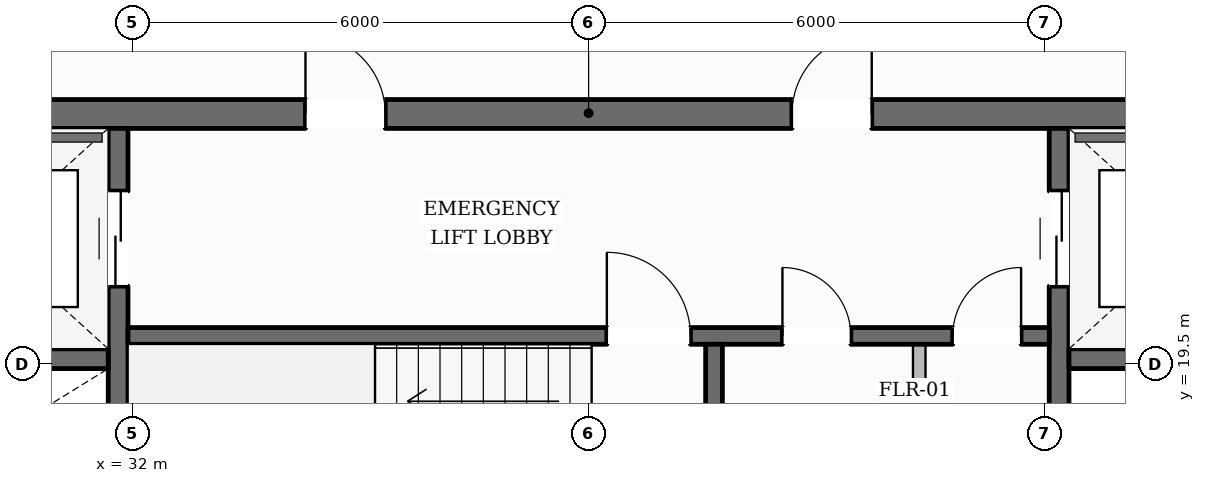
"""IFC4 building model, lengths in metres.
Left out: names, types, materials, properties, quantities, classifications, styles, units other than length and angle.
Written with IfcOpenShell. Run it as: python <this file> out.ifc"""

import sys

from ifc_helpers import new_model, si_unit, direction, frame, frame_2d, origin, place, context, subcontext, project, spatial, rectangle, extrude, element, fill, save


model = new_model("IFC4")
c1 = context("Model", 3, precision=1e-05, world=origin(), true_north=direction((0.0, 1.0)))
c2 = subcontext(c1, "Body", "Model", "MODEL_VIEW")
j1 = project(units=[si_unit("LENGTHUNIT", "METRE"), si_unit("PLANEANGLEUNIT", "RADIAN")], contexts=[c1])
p1 = place(None, origin())
s1 = spatial("IfcSite", under=j1, at=p1, CompositionType="ELEMENT")
p2 = place(p1, origin())
s2 = spatial("IfcBuilding", under=s1, at=p2, CompositionType="ELEMENT")
p3 = place(p2, frame((0.0, 0.0, 243.35)))
s3 = spatial("IfcBuildingStorey", under=s2, at=p3, CompositionType="ELEMENT", Elevation=243.35)
p4 = place(p3, frame((28.1, 22.79, 0.0), z_axis=(0.0, 0.0, 1.0), x_axis=(1.0, 0.0, 0.0)))
e1 = element("IfcWall", 1, at=p4, inside=s3, PredefinedType="SOLIDWALL", context=c2, shape_type="SweptSolid", body=[
    extrude(rectangle(XDim=19.8, YDim=0.38, at=frame_2d((9.9, 0.0))), origin(), (0.0, 0.0, 1.0), 3.61),
])
p5 = place(p4, frame((6.175, 0.0, 0.0)))
e2 = element("IfcOpeningElement", 2, at=p5, cuts=e1, PredefinedType="OPENING", context=c2, shape_type="SweptSolid", body=[
    extrude(rectangle(XDim=1.05, YDim=2.15, at=frame_2d((0.525, 1.075))), frame((0.0, 0.2, 0.0), z_axis=(0.0, -1.0, 0.0), x_axis=(1.0, 0.0, 0.0)), (0.0, 0.0, 1.0), 0.4),
])
p6 = place(p4, frame((12.575, 0.0, 0.0)))
e3 = element("IfcOpeningElement", 3, at=p6, cuts=e1, PredefinedType="OPENING", context=c2, shape_type="SweptSolid", body=[
    extrude(rectangle(XDim=1.05, YDim=2.15, at=frame_2d((0.525, 1.075))), frame((0.0, 0.2, 0.0), z_axis=(0.0, -1.0, 0.0), x_axis=(1.0, 0.0, 0.0)), (0.0, 0.0, 1.0), 0.4),
])
p7 = place(p3, frame((31.81, 9.6, 0.0), z_axis=(0.0, 0.0, 1.0), x_axis=(0.0, 1.0, 0.0)))
e4 = element("IfcWall", 4, at=p7, inside=s3, PredefinedType="SHEAR", context=c2, shape_type="SweptSolid", body=[
    extrude(rectangle(XDim=13.0, YDim=0.26, at=frame_2d((6.5, 0.0))), origin(), (0.0, 0.0, 1.0), 3.61),
])
p8 = place(p7, frame((10.925, 0.0, 0.0)))
e5 = element("IfcOpeningElement", 5, at=p8, cuts=e4, PredefinedType="OPENING", context=c2, shape_type="SweptSolid", body=[
    extrude(rectangle(XDim=1.25, YDim=2.25, at=frame_2d((0.625, 1.125))), frame((0.0, 0.14, 0.0), z_axis=(0.0, -1.0, 0.0), x_axis=(1.0, 0.0, 0.0)), (0.0, 0.0, 1.0), 0.28),
])
p9 = place(p3, frame((44.19, 9.6, 0.0), z_axis=(0.0, 0.0, 1.0), x_axis=(0.0, 1.0, 0.0)))
e6 = element("IfcWall", 6, at=p9, inside=s3, PredefinedType="SHEAR", context=c2, shape_type="SweptSolid", body=[
    extrude(rectangle(XDim=13.0, YDim=0.26, at=frame_2d((6.5, 0.0))), origin(), (0.0, 0.0, 1.0), 3.61),
])
p10 = place(p9, frame((10.925, 0.0, 0.0)))
e7 = element("IfcOpeningElement", 7, at=p10, cuts=e6, PredefinedType="OPENING", context=c2, shape_type="SweptSolid", body=[
    extrude(rectangle(XDim=1.25, YDim=2.25, at=frame_2d((0.625, 1.125))), frame((0.0, 0.14, 0.0), z_axis=(0.0, -1.0, 0.0), x_axis=(1.0, 0.0, 0.0)), (0.0, 0.0, 1.0), 0.28),
])
for number, where, z_axis, x_axis in (
    (8, (28.48, 19.57, 0.0), (0.0, 0.0, 1.0), (1.0, 0.0, 0.0)),
    (9, (44.32, 19.57, 0.0), (0.0, 0.0, 1.0), (1.0, 0.0, 0.0)),
):
    element("IfcWall", number, at=place(p3, frame(where, z_axis=z_axis, x_axis=x_axis)), inside=s3, PredefinedType="SHEAR", context=c2, shape_type="SweptSolid", body=[
        extrude(rectangle(XDim=3.2, YDim=0.26, at=frame_2d((1.6, 0.0))), origin(), (0.0, 0.0, 1.0), 3.61),
    ])
p11 = place(p3, frame((31.94, 19.87, 0.0), z_axis=(0.0, 0.0, 1.0), x_axis=(1.0, 0.0, 0.0)))
e10 = element("IfcWall", 10, at=p11, inside=s3, PredefinedType="SOLIDWALL", context=c2, shape_type="SweptSolid", body=[
    extrude(rectangle(XDim=12.12, YDim=0.22, at=frame_2d((6.06, 0.0))), origin(), (0.0, 0.0, 1.0), 3.61),
])
p12 = place(p11, frame((6.3, 0.0, 0.0)))
e11 = element("IfcOpeningElement", 11, at=p12, cuts=e10, PredefinedType="OPENING", context=c2, shape_type="SweptSolid", body=[
    extrude(rectangle(XDim=1.1, YDim=2.15, at=frame_2d((0.55, 1.075))), frame((0.0, 0.12, 0.0), z_axis=(0.0, -1.0, 0.0), x_axis=(1.0, 0.0, 0.0)), (0.0, 0.0, 1.0), 0.24),
])
p13 = place(p11, frame((8.61, 0.0, 0.0)))
e12 = element("IfcOpeningElement", 12, at=p13, cuts=e10, PredefinedType="OPENING", context=c2, shape_type="SweptSolid", body=[
    extrude(rectangle(XDim=0.9, YDim=2.1, at=frame_2d((0.45, 1.05))), frame((0.0, 0.12, 0.0), z_axis=(0.0, -1.0, 0.0), x_axis=(1.0, 0.0, 0.0)), (0.0, 0.0, 1.0), 0.24),
])
p14 = place(p11, frame((10.85, 0.0, 0.0)))
e13 = element("IfcOpeningElement", 13, at=p14, cuts=e10, PredefinedType="OPENING", context=c2, shape_type="SweptSolid", body=[
    extrude(rectangle(XDim=0.9, YDim=2.1, at=frame_2d((0.45, 1.05))), frame((0.0, 0.12, 0.0), z_axis=(0.0, -1.0, 0.0), x_axis=(1.0, 0.0, 0.0)), (0.0, 0.0, 1.0), 0.24),
])
p15 = place(p3, frame((39.65, 16.56, 0.0), z_axis=(0.0, 0.0, 1.0), x_axis=(0.0, 1.0, 0.0)))
e14 = element("IfcWall", 14, at=p15, inside=s3, PredefinedType="SOLIDWALL", context=c2, shape_type="SweptSolid", body=[
    extrude(rectangle(XDim=3.2, YDim=0.22, at=frame_2d((1.6, 0.0))), origin(), (0.0, 0.0, 1.0), 3.61),
])
p16 = place(p3, frame((16.275, 11.379, 0.0), z_axis=(0.0, 0.0, 1.0), x_axis=(0.490746172412, 0.871302584791, 0.0)))
e15 = element("IfcWall", 15, at=p16, inside=s3, PredefinedType="STANDARD", context=c2, shape_type="SweptSolid", body=[
    extrude(rectangle(XDim=37.617, YDim=0.35, at=frame_2d((18.809, 0.0))), origin(), (0.0, 0.0, 1.0), 3.196),
])
p17 = place(p16, frame((33.404, 0.0, 0.65)))
e16 = element("IfcOpeningElement", 16, at=p17, cuts=e15, PredefinedType="OPENING", context=c2, shape_type="SweptSolid", body=[
    extrude(rectangle(XDim=1.35, YDim=1.75, at=frame_2d((0.675, 0.875))), frame((0.0, 0.185, 0.0), z_axis=(0.0, -1.0, 0.0), x_axis=(1.0, 0.0, 0.0)), (0.0, 0.0, 1.0), 0.37),
])
p18 = place(p16, frame((27.294, 0.0, 0.65)))
e17 = element("IfcOpeningElement", 17, at=p18, cuts=e15, PredefinedType="OPENING", context=c2, shape_type="SweptSolid", body=[
    extrude(rectangle(XDim=1.35, YDim=1.75, at=frame_2d((0.675, 0.875))), frame((0.0, 0.185, 0.0), z_axis=(0.0, -1.0, 0.0), x_axis=(1.0, 0.0, 0.0)), (0.0, 0.0, 1.0), 0.37),
])
p19 = place(p16, frame((15.073, 0.0, 0.65)))
e18 = element("IfcOpeningElement", 18, at=p19, cuts=e15, PredefinedType="OPENING", context=c2, shape_type="SweptSolid", body=[
    extrude(rectangle(XDim=1.35, YDim=1.75, at=frame_2d((0.675, 0.875))), frame((0.0, 0.185, 0.0), z_axis=(0.0, -1.0, 0.0), x_axis=(1.0, 0.0, 0.0)), (0.0, 0.0, 1.0), 0.37),
])
p20 = place(p16, frame((8.963, 0.0, 0.65)))
e19 = element("IfcOpeningElement", 19, at=p20, cuts=e15, PredefinedType="OPENING", context=c2, shape_type="SweptSolid", body=[
    extrude(rectangle(XDim=1.35, YDim=1.75, at=frame_2d((0.675, 0.875))), frame((0.0, 0.185, 0.0), z_axis=(0.0, -1.0, 0.0), x_axis=(1.0, 0.0, 0.0)), (0.0, 0.0, 1.0), 0.37),
])
p21 = place(p16, frame((2.853, 0.0, 0.65)))
e20 = element("IfcOpeningElement", 20, at=p21, cuts=e15, PredefinedType="OPENING", context=c2, shape_type="SweptSolid", body=[
    extrude(rectangle(XDim=1.35, YDim=1.75, at=frame_2d((0.675, 0.875))), frame((0.0, 0.185, 0.0), z_axis=(0.0, -1.0, 0.0), x_axis=(1.0, 0.0, 0.0)), (0.0, 0.0, 1.0), 0.37),
])
p22 = place(p3, frame((41.362, 44.097, 0.0), z_axis=(0.0, 0.0, 1.0), x_axis=(0.497556414716, -0.867431619308, 0.0)))
e21 = element("IfcWall", 21, at=p22, inside=s3, PredefinedType="STANDARD", context=c2, shape_type="SweptSolid", body=[
    extrude(rectangle(XDim=38.118, YDim=0.35, at=frame_2d((19.059, 0.0))), origin(), (0.0, 0.0, 1.0), 3.196),
])
p23 = place(p22, frame((33.873, 0.0, 0.65)))
e22 = element("IfcOpeningElement", 22, at=p23, cuts=e21, PredefinedType="OPENING", context=c2, shape_type="SweptSolid", body=[
    extrude(rectangle(XDim=1.35, YDim=1.75, at=frame_2d((0.675, 0.875))), frame((0.0, 0.185, 0.0), z_axis=(0.0, -1.0, 0.0), x_axis=(1.0, 0.0, 0.0)), (0.0, 0.0, 1.0), 0.37),
])
p24 = place(p22, frame((27.678, 0.0, 0.65)))
e23 = element("IfcOpeningElement", 23, at=p24, cuts=e21, PredefinedType="OPENING", context=c2, shape_type="SweptSolid", body=[
    extrude(rectangle(XDim=1.35, YDim=1.75, at=frame_2d((0.675, 0.875))), frame((0.0, 0.185, 0.0), z_axis=(0.0, -1.0, 0.0), x_axis=(1.0, 0.0, 0.0)), (0.0, 0.0, 1.0), 0.37),
])
p25 = place(p22, frame((15.288, 0.0, 0.65)))
e24 = element("IfcOpeningElement", 24, at=p25, cuts=e21, PredefinedType="OPENING", context=c2, shape_type="SweptSolid", body=[
    extrude(rectangle(XDim=1.35, YDim=1.75, at=frame_2d((0.675, 0.875))), frame((0.0, 0.185, 0.0), z_axis=(0.0, -1.0, 0.0), x_axis=(1.0, 0.0, 0.0)), (0.0, 0.0, 1.0), 0.37),
])
p26 = place(p22, frame((9.093, 0.0, 0.65)))
e25 = element("IfcOpeningElement", 25, at=p26, cuts=e21, PredefinedType="OPENING", context=c2, shape_type="SweptSolid", body=[
    extrude(rectangle(XDim=1.35, YDim=1.75, at=frame_2d((0.675, 0.875))), frame((0.0, 0.185, 0.0), z_axis=(0.0, -1.0, 0.0), x_axis=(1.0, 0.0, 0.0)), (0.0, 0.0, 1.0), 0.37),
])
p27 = place(p22, frame((2.898, 0.0, 0.65)))
e26 = element("IfcOpeningElement", 26, at=p27, cuts=e21, PredefinedType="OPENING", context=c2, shape_type="SweptSolid", body=[
    extrude(rectangle(XDim=1.35, YDim=1.75, at=frame_2d((0.675, 0.875))), frame((0.0, 0.185, 0.0), z_axis=(0.0, -1.0, 0.0), x_axis=(1.0, 0.0, 0.0)), (0.0, 0.0, 1.0), 0.37),
])
p28 = place(p3, frame((42.35, 16.56, 0.0), z_axis=(0.0, 0.0, 1.0), x_axis=(0.0, 1.0, 0.0)))
e27 = element("IfcWall", 27, at=p28, inside=s3, PredefinedType="PARTITIONING", context=c2, shape_type="SweptSolid", body=[
    extrude(rectangle(XDim=3.2, YDim=0.165, at=frame_2d((1.6, 0.0))), origin(), (0.0, 0.0, 1.0), 3.61),
])
p29 = place(p12, origin())
e28 = element("IfcDoor", 28, at=p29, inside=s3, OperationType="SINGLE_SWING_LEFT", PredefinedType="DOOR", context=c2, shape_type="SweptSolid", body=[
    extrude(rectangle(XDim=1.1, YDim=2.15, at=frame_2d((0.55, 1.075))), frame((0.0, 0.025, 0.0), z_axis=(0.0, -1.0, 0.0), x_axis=(1.0, 0.0, 0.0)), (0.0, 0.0, 1.0), 0.05),
])
fill(e11, e28)
p30 = place(p5, origin())
e29 = element("IfcDoor", 29, at=p30, inside=s3, OperationType="SINGLE_SWING_LEFT", PredefinedType="DOOR", context=c2, shape_type="SweptSolid", body=[
    extrude(rectangle(XDim=1.05, YDim=2.15, at=frame_2d((0.525, 1.075))), frame((0.0, 0.025, 0.0), z_axis=(0.0, -1.0, 0.0), x_axis=(1.0, 0.0, 0.0)), (0.0, 0.0, 1.0), 0.05),
])
fill(e2, e29)
p31 = place(p6, origin())
e30 = element("IfcDoor", 30, at=p31, inside=s3, OperationType="SINGLE_SWING_RIGHT", PredefinedType="DOOR", context=c2, shape_type="SweptSolid", body=[
    extrude(rectangle(XDim=1.05, YDim=2.15, at=frame_2d((0.525, 1.075))), frame((0.0, 0.025, 0.0), z_axis=(0.0, -1.0, 0.0), x_axis=(1.0, 0.0, 0.0)), (0.0, 0.0, 1.0), 0.05),
])
fill(e3, e30)
p32 = place(p8, origin())
e31 = element("IfcDoor", 31, at=p32, inside=s3, OperationType="DOUBLE_DOOR_SLIDING", PredefinedType="DOOR", context=c2, shape_type="SweptSolid", body=[
    extrude(rectangle(XDim=1.25, YDim=2.25, at=frame_2d((0.625, 1.125))), frame((0.0, 0.025, 0.0), z_axis=(0.0, -1.0, 0.0), x_axis=(1.0, 0.0, 0.0)), (0.0, 0.0, 1.0), 0.05),
])
fill(e5, e31)
p33 = place(p10, origin())
e32 = element("IfcDoor", 32, at=p33, inside=s3, OperationType="DOUBLE_DOOR_SLIDING", PredefinedType="DOOR", context=c2, shape_type="SweptSolid", body=[
    extrude(rectangle(XDim=1.25, YDim=2.25, at=frame_2d((0.625, 1.125))), frame((0.0, 0.025, 0.0), z_axis=(0.0, -1.0, 0.0), x_axis=(1.0, 0.0, 0.0)), (0.0, 0.0, 1.0), 0.05),
])
fill(e7, e32)
p34 = place(p13, origin())
e33 = element("IfcDoor", 33, at=p34, inside=s3, OperationType="SINGLE_SWING_LEFT", PredefinedType="DOOR", context=c2, shape_type="SweptSolid", body=[
    extrude(rectangle(XDim=0.9, YDim=2.1, at=frame_2d((0.45, 1.05))), frame((0.0, 0.025, 0.0), z_axis=(0.0, -1.0, 0.0), x_axis=(1.0, 0.0, 0.0)), (0.0, 0.0, 1.0), 0.05),
])
fill(e12, e33)
p35 = place(p14, origin())
e34 = element("IfcDoor", 34, at=p35, inside=s3, OperationType="SINGLE_SWING_RIGHT", PredefinedType="DOOR", context=c2, shape_type="SweptSolid", body=[
    extrude(rectangle(XDim=0.9, YDim=2.1, at=frame_2d((0.45, 1.05))), frame((0.0, 0.025, 0.0), z_axis=(0.0, -1.0, 0.0), x_axis=(1.0, 0.0, 0.0)), (0.0, 0.0, 1.0), 0.05),
])
fill(e13, e34)
save(model, sys.argv[1])
